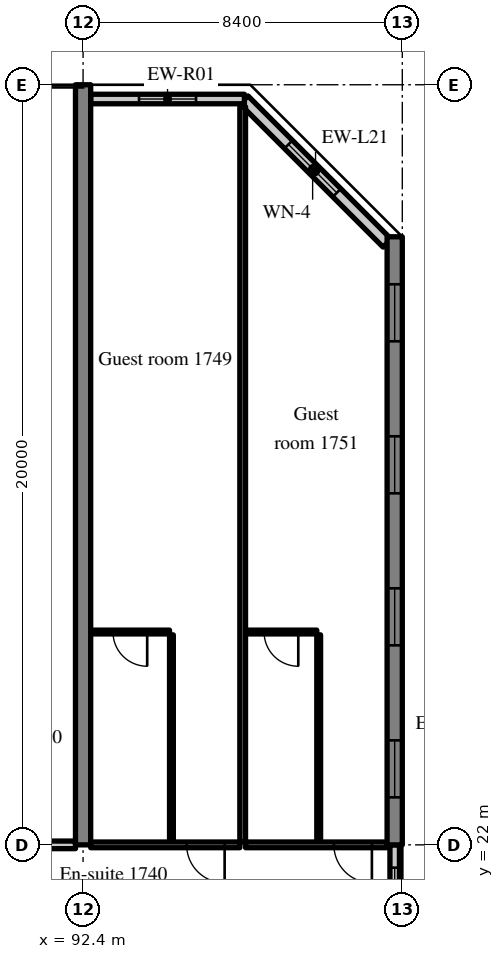
"""IFC4 building model, lengths in metres.
Left out: names, types, materials, properties, quantities, classifications, styles, units other than length and angle.
Written with IfcOpenShell. Run it as: python <this file> out.ifc"""

import sys

from ifc_helpers import new_model, si_unit, direction, frame, frame_2d, origin, place, context, subcontext, project, spatial, rectangle, extrude, source, transform, mapped, element, fill, save


model = new_model("IFC4")
c1 = context("Model", 3, precision=1e-05, world=origin(), true_north=direction((0.0, 1.0)))
c2 = subcontext(c1, "Body", "Model", "MODEL_VIEW")
j1 = project(units=[si_unit("LENGTHUNIT", "METRE"), si_unit("PLANEANGLEUNIT", "RADIAN")], contexts=[c1])
p1 = place(None, origin())
s1 = spatial("IfcSite", under=j1, at=p1, CompositionType="ELEMENT")
p2 = place(p1, origin())
s2 = spatial("IfcBuilding", under=s1, at=p2, CompositionType="ELEMENT")
p3 = place(p2, frame((0.0, 0.0, 73.4)))
s3 = spatial("IfcBuildingStorey", under=s2, at=p3, CompositionType="ELEMENT", Elevation=73.4)
m1 = source(origin(), c2, "Body", "SweptSolid", [
    extrude(rectangle(XDim=20.0, YDim=0.4, at=frame_2d((10.0, 0.0))), origin(), (0.0, 0.0, 1.0), 3.52),
])
p4 = place(p3, frame((92.4, 22.0, 0.0), z_axis=(0.0, 0.0, 1.0), x_axis=(0.0, 1.0, 0.0)))
e1 = element("IfcWall", 1, at=p4, inside=s3, PredefinedType="SHEAR", context=c2, shape_type="MappedRepresentation", body=[
    mapped(m1, transform((0.0, 0.0, 0.0), scale=1.0)),
])
m2 = source(origin(), c2, "Body", "SweptSolid", [
    extrude(rectangle(XDim=16.0, YDim=0.4, at=frame_2d((8.0, 0.0))), origin(), (0.0, 0.0, 1.0), 3.52),
])
p5 = place(p3, frame((100.6, 22.0, 0.0), z_axis=(0.0, 0.0, 1.0), x_axis=(0.0, 1.0, 0.0)))
e2 = element("IfcWall", 2, at=p5, inside=s3, PredefinedType="SHEAR", context=c2, shape_type="MappedRepresentation", body=[
    mapped(m2, transform((0.0, 0.0, 0.0), scale=1.0)),
])
m3 = source(origin(), c2, "Body", "SweptSolid", [
    extrude(rectangle(XDim=1.5, YDim=1.5, at=frame_2d((0.75, 0.75))), frame((0.0, 0.21, 0.0), z_axis=(0.0, -1.0, 0.0), x_axis=(1.0, 0.0, 0.0)), (0.0, 0.0, 1.0), 0.42),
])
p6 = place(p5, frame((1.25, 0.0, 0.9)))
e3 = element("IfcOpeningElement", 3, at=p6, cuts=e2, PredefinedType="OPENING", context=c2, shape_type="MappedRepresentation", body=[
    mapped(m3, transform((0.0, 0.0, 0.0), scale=1.0)),
])
p7 = place(p5, frame((5.25, 0.0, 0.9)))
e4 = element("IfcOpeningElement", 4, at=p7, cuts=e2, PredefinedType="OPENING", context=c2, shape_type="MappedRepresentation", body=[
    mapped(m3, transform((0.0, 0.0, 0.0), scale=1.0)),
])
p8 = place(p5, frame((9.25, 0.0, 0.9)))
e5 = element("IfcOpeningElement", 5, at=p8, cuts=e2, PredefinedType="OPENING", context=c2, shape_type="MappedRepresentation", body=[
    mapped(m3, transform((0.0, 0.0, 0.0), scale=1.0)),
])
p9 = place(p5, frame((13.25, 0.0, 0.9)))
e6 = element("IfcOpeningElement", 6, at=p9, cuts=e2, PredefinedType="OPENING", context=c2, shape_type="MappedRepresentation", body=[
    mapped(m3, transform((0.0, 0.0, 0.0), scale=1.0)),
])
m4 = source(origin(), c2, "Body", "SweptSolid", [
    extrude(rectangle(XDim=5.326, YDim=0.3, at=frame_2d((2.663, 0.0))), origin(), (0.0, 0.0, 1.0), 3.52),
])
p10 = place(p3, frame((100.4, 37.834, 0.0), z_axis=(0.0, 0.0, 1.0), x_axis=(-0.707083859269, 0.707129702361, 0.0)))
e7 = element("IfcWall", 7, at=p10, inside=s3, PredefinedType="SOLIDWALL", context=c2, shape_type="MappedRepresentation", body=[
    mapped(m4, transform((0.0, 0.0, 0.0), scale=1.0)),
])
m5 = source(origin(), c2, "Body", "SweptSolid", [
    extrude(rectangle(XDim=1.8, YDim=1.5, at=frame_2d((0.9, 0.75))), frame((0.0, 0.16, 0.0), z_axis=(0.0, -1.0, 0.0), x_axis=(1.0, 0.0, 0.0)), (0.0, 0.0, 1.0), 0.32),
])
p11 = place(p10, frame((1.871, 0.0, 0.9)))
e8 = element("IfcOpeningElement", 8, at=p11, cuts=e7, PredefinedType="OPENING", context=c2, shape_type="MappedRepresentation", body=[
    mapped(m5, transform((0.0, 0.0, 0.0), scale=1.0)),
])
m6 = source(origin(), c2, "Body", "SweptSolid", [
    extrude(rectangle(XDim=4.045, YDim=0.25, at=frame_2d((2.022, 0.0))), origin(), (0.0, 0.0, 1.0), 2.82),
])
p12 = place(p3, frame((96.645, 41.625, 0.0), z_axis=(0.0, 0.0, 1.0), x_axis=(-1.0, 0.0, 0.0)))
e9 = element("IfcWall", 9, at=p12, inside=s3, PredefinedType="SOLIDWALL", context=c2, shape_type="MappedRepresentation", body=[
    mapped(m6, transform((0.0, 0.0, 0.0), scale=1.0)),
])
m7 = source(origin(), c2, "Body", "SweptSolid", [
    extrude(rectangle(XDim=1.5, YDim=1.5, at=frame_2d((0.75, 0.75))), frame((0.0, 0.135, 0.0), z_axis=(0.0, -1.0, 0.0), x_axis=(1.0, 0.0, 0.0)), (0.0, 0.0, 1.0), 0.27),
])
p13 = place(p12, frame((1.272, 0.0, 0.9)))
e10 = element("IfcOpeningElement", 10, at=p13, cuts=e9, PredefinedType="OPENING", context=c2, shape_type="MappedRepresentation", body=[
    mapped(m7, transform((0.0, 0.0, 0.0), scale=1.0)),
])
m8 = source(origin(), c2, "Body", "SweptSolid", [
    extrude(rectangle(XDim=2.4, YDim=0.25, at=frame_2d((1.2, 0.0))), origin(), (0.0, 0.0, 1.0), 2.62),
])
p14 = place(p3, frame((100.6, 19.6, 0.0), z_axis=(0.0, 0.0, 1.0), x_axis=(0.0, 1.0, 0.0)))
e11 = element("IfcWall", 11, at=p14, inside=s3, PredefinedType="SOLIDWALL", context=c2, shape_type="MappedRepresentation", body=[
    mapped(m8, transform((0.0, 0.0, 0.0), scale=1.0)),
])
m9 = source(origin(), c2, "Body", "SweptSolid", [
    extrude(rectangle(XDim=1.2, YDim=1.5, at=frame_2d((0.6, 0.75))), frame((0.0, 0.135, 0.0), z_axis=(0.0, -1.0, 0.0), x_axis=(1.0, 0.0, 0.0)), (0.0, 0.0, 1.0), 0.27),
])
p15 = place(p14, frame((0.6, 0.0, 0.9)))
e12 = element("IfcOpeningElement", 12, at=p15, cuts=e11, PredefinedType="OPENING", context=c2, shape_type="MappedRepresentation", body=[
    mapped(m9, transform((0.0, 0.0, 0.0), scale=1.0)),
])
m10 = source(origin(), c2, "Body", "SweptSolid", [
    extrude(rectangle(XDim=5.45, YDim=0.1, at=frame_2d((2.725, 0.0))), origin(), (0.0, 0.0, 1.0), 3.52),
])
p16 = place(p3, frame((94.725, 22.075, 0.0), z_axis=(0.0, 0.0, 1.0), x_axis=(0.0, 1.0, 0.0)))
e13 = element("IfcWall", 13, at=p16, inside=s3, PredefinedType="PARTITIONING", context=c2, shape_type="MappedRepresentation", body=[
    mapped(m10, transform((0.0, 0.0, 0.0), scale=1.0)),
])
m11 = source(origin(), c2, "Body", "SweptSolid", [
    extrude(rectangle(XDim=2.075, YDim=0.1, at=frame_2d((1.038, 0.0))), origin(), (0.0, 0.0, 1.0), 3.52),
])
p17 = place(p3, frame((92.6, 27.6, 0.0), z_axis=(0.0, 0.0, 1.0), x_axis=(1.0, 0.0, 0.0)))
e14 = element("IfcWall", 14, at=p17, inside=s3, PredefinedType="PARTITIONING", context=c2, shape_type="MappedRepresentation", body=[
    mapped(m11, transform((0.0, 0.0, 0.0), scale=1.0)),
])
m12 = source(origin(), c2, "Body", "SweptSolid", [
    extrude(rectangle(XDim=0.9, YDim=2.1, at=frame_2d((0.45, 1.05))), frame((0.0, 0.06, 0.0), z_axis=(0.0, -1.0, 0.0), x_axis=(1.0, 0.0, 0.0)), (0.0, 0.0, 1.0), 0.12),
])
p18 = place(p17, frame((0.587, 0.0, 0.0)))
e15 = element("IfcOpeningElement", 15, at=p18, cuts=e14, PredefinedType="OPENING", context=c2, shape_type="MappedRepresentation", body=[
    mapped(m12, transform((0.0, 0.0, 0.0), scale=1.0)),
])
m13 = source(origin(), c2, "Body", "SweptSolid", [
    extrude(rectangle(XDim=3.925, YDim=0.15, at=frame_2d((1.962, 0.0))), origin(), (0.0, 0.0, 1.0), 2.82),
])
p19 = place(p3, frame((92.6, 22.0, 0.0), z_axis=(0.0, 0.0, 1.0), x_axis=(1.0, 0.0, 0.0)))
e16 = element("IfcWall", 16, at=p19, inside=s3, PredefinedType="PARTITIONING", context=c2, shape_type="MappedRepresentation", body=[
    mapped(m13, transform((0.0, 0.0, 0.0), scale=1.0)),
])
m14 = source(origin(), c2, "Body", "SweptSolid", [
    extrude(rectangle(XDim=1.0, YDim=2.1, at=frame_2d((0.5, 1.05))), frame((0.0, 0.085, 0.0), z_axis=(0.0, -1.0, 0.0), x_axis=(1.0, 0.0, 0.0)), (0.0, 0.0, 1.0), 0.17),
])
p20 = place(p19, frame((2.525, 0.0, 0.0)))
e17 = element("IfcOpeningElement", 17, at=p20, cuts=e16, PredefinedType="OPENING", context=c2, shape_type="MappedRepresentation", body=[
    mapped(m14, transform((0.0, 0.0, 0.0), scale=1.0)),
])
p21 = place(p3, frame((98.6, 22.075, 0.0), z_axis=(0.0, 0.0, 1.0), x_axis=(0.0, 1.0, 0.0)))
e18 = element("IfcWall", 18, at=p21, inside=s3, PredefinedType="PARTITIONING", context=c2, shape_type="MappedRepresentation", body=[
    mapped(m10, transform((0.0, 0.0, 0.0), scale=1.0)),
])
m15 = source(origin(), c2, "Body", "SweptSolid", [
    extrude(rectangle(XDim=1.875, YDim=0.1, at=frame_2d((0.938, 0.0))), origin(), (0.0, 0.0, 1.0), 3.52),
])
p22 = place(p3, frame((96.675, 27.6, 0.0), z_axis=(0.0, 0.0, 1.0), x_axis=(1.0, 0.0, 0.0)))
e19 = element("IfcWall", 19, at=p22, inside=s3, PredefinedType="PARTITIONING", context=c2, shape_type="MappedRepresentation", body=[
    mapped(m15, transform((0.0, 0.0, 0.0), scale=1.0)),
])
p23 = place(p22, frame((0.488, 0.0, 0.0)))
e20 = element("IfcOpeningElement", 20, at=p23, cuts=e19, PredefinedType="OPENING", context=c2, shape_type="MappedRepresentation", body=[
    mapped(m12, transform((0.0, 0.0, 0.0), scale=1.0)),
])
m16 = source(origin(), c2, "Body", "SweptSolid", [
    extrude(rectangle(XDim=3.725, YDim=0.15, at=frame_2d((1.862, 0.0))), origin(), (0.0, 0.0, 1.0), 2.82),
])
p24 = place(p3, frame((96.675, 22.0, 0.0), z_axis=(0.0, 0.0, 1.0), x_axis=(1.0, 0.0, 0.0)))
e21 = element("IfcWall", 21, at=p24, inside=s3, PredefinedType="PARTITIONING", context=c2, shape_type="MappedRepresentation", body=[
    mapped(m16, transform((0.0, 0.0, 0.0), scale=1.0)),
])
p25 = place(p24, frame((2.325, 0.0, 0.0)))
e22 = element("IfcOpeningElement", 22, at=p25, cuts=e21, PredefinedType="OPENING", context=c2, shape_type="MappedRepresentation", body=[
    mapped(m14, transform((0.0, 0.0, 0.0), scale=1.0)),
])
m17 = source(origin(), c2, "Body", "SweptSolid", [
    extrude(rectangle(XDim=19.347, YDim=0.15, at=frame_2d((9.674, 0.0))), origin(), (0.0, 0.0, 1.0), 3.52),
])
p26 = place(p3, frame((96.6, 22.075, 0.0), z_axis=(0.0, 0.0, 1.0), x_axis=(0.0, 1.0, 0.0)))
e23 = element("IfcWall", 23, at=p26, inside=s3, PredefinedType="PARTITIONING", context=c2, shape_type="MappedRepresentation", body=[
    mapped(m17, transform((0.0, 0.0, 0.0), scale=1.0)),
])
m18 = source(origin(), c2, "Body", "SweptSolid", [
    extrude(rectangle(XDim=8.0, YDim=0.2, at=frame_2d((4.0, 0.0))), origin(), (0.0, 0.0, 1.0), 2.82),
])
p27 = place(p3, frame((84.2, 22.0, 0.0), z_axis=(0.0, 0.0, 1.0), x_axis=(1.0, 0.0, 0.0)))
e24 = element("IfcWall", 24, at=p27, inside=s3, PredefinedType="PARTITIONING", context=c2, shape_type="MappedRepresentation", body=[
    mapped(m18, transform((0.0, 0.0, 0.0), scale=1.0)),
])
m19 = source(origin(), c2, "Body", "SweptSolid", [
    extrude(rectangle(XDim=1.8, YDim=1.5, at=frame_2d((0.9, 0.75))), frame((0.0, 0.03, 0.0), z_axis=(0.0, -1.0, 0.0), x_axis=(1.0, 0.0, 0.0)), (0.0, 0.0, 1.0), 0.06),
])
p28 = place(p11, origin())
e25 = element("IfcWindow", 25, at=p28, inside=s3, PartitioningType="SINGLE_PANEL", PredefinedType="WINDOW", context=c2, shape_type="MappedRepresentation", body=[
    mapped(m19, transform((0.0, 0.0, 0.0), scale=1.0)),
])
fill(e8, e25)
m20 = source(origin(), c2, "Body", "SweptSolid", [
    extrude(rectangle(XDim=1.5, YDim=1.5, at=frame_2d((0.75, 0.75))), frame((0.0, 0.03, 0.0), z_axis=(0.0, -1.0, 0.0), x_axis=(1.0, 0.0, 0.0)), (0.0, 0.0, 1.0), 0.06),
])
p29 = place(p13, origin())
e26 = element("IfcWindow", 26, at=p29, inside=s3, PartitioningType="SINGLE_PANEL", PredefinedType="WINDOW", context=c2, shape_type="MappedRepresentation", body=[
    mapped(m20, transform((0.0, 0.0, 0.0), scale=1.0)),
])
fill(e10, e26)
p30 = place(p6, origin())
e27 = element("IfcWindow", 27, at=p30, inside=s3, PartitioningType="SINGLE_PANEL", PredefinedType="WINDOW", context=c2, shape_type="MappedRepresentation", body=[
    mapped(m20, transform((0.0, 0.0, 0.0), scale=1.0)),
])
fill(e3, e27)
p31 = place(p7, origin())
e28 = element("IfcWindow", 28, at=p31, inside=s3, PartitioningType="SINGLE_PANEL", PredefinedType="WINDOW", context=c2, shape_type="MappedRepresentation", body=[
    mapped(m20, transform((0.0, 0.0, 0.0), scale=1.0)),
])
fill(e4, e28)
p32 = place(p8, origin())
e29 = element("IfcWindow", 29, at=p32, inside=s3, PartitioningType="SINGLE_PANEL", PredefinedType="WINDOW", context=c2, shape_type="MappedRepresentation", body=[
    mapped(m20, transform((0.0, 0.0, 0.0), scale=1.0)),
])
fill(e5, e29)
p33 = place(p9, origin())
e30 = element("IfcWindow", 30, at=p33, inside=s3, PartitioningType="SINGLE_PANEL", PredefinedType="WINDOW", context=c2, shape_type="MappedRepresentation", body=[
    mapped(m20, transform((0.0, 0.0, 0.0), scale=1.0)),
])
fill(e6, e30)
m21 = source(origin(), c2, "Body", "SweptSolid", [
    extrude(rectangle(XDim=1.2, YDim=1.5, at=frame_2d((0.6, 0.75))), frame((0.0, 0.03, 0.0), z_axis=(0.0, -1.0, 0.0), x_axis=(1.0, 0.0, 0.0)), (0.0, 0.0, 1.0), 0.06),
])
p34 = place(p15, origin())
e31 = element("IfcWindow", 31, at=p34, inside=s3, PartitioningType="SINGLE_PANEL", PredefinedType="WINDOW", context=c2, shape_type="MappedRepresentation", body=[
    mapped(m21, transform((0.0, 0.0, 0.0), scale=1.0)),
])
fill(e12, e31)
m22 = source(origin(), c2, "Body", "SweptSolid", [
    extrude(rectangle(XDim=0.9, YDim=2.1, at=frame_2d((0.45, 1.05))), frame((0.0, 0.025, 0.0), z_axis=(0.0, -1.0, 0.0), x_axis=(1.0, 0.0, 0.0)), (0.0, 0.0, 1.0), 0.05),
])
p35 = place(p18, origin())
e32 = element("IfcDoor", 32, at=p35, inside=s3, OperationType="SINGLE_SWING_RIGHT", PredefinedType="DOOR", context=c2, shape_type="MappedRepresentation", body=[
    mapped(m22, transform((0.0, 0.0, 0.0), scale=1.0)),
])
fill(e15, e32)
m23 = source(origin(), c2, "Body", "SweptSolid", [
    extrude(rectangle(XDim=1.0, YDim=2.1, at=frame_2d((0.5, 1.05))), frame((0.0, 0.025, 0.0), z_axis=(0.0, -1.0, 0.0), x_axis=(1.0, 0.0, 0.0)), (0.0, 0.0, 1.0), 0.05),
])
p36 = place(p20, origin())
e33 = element("IfcDoor", 33, at=p36, inside=s3, OperationType="SINGLE_SWING_RIGHT", PredefinedType="DOOR", context=c2, shape_type="MappedRepresentation", body=[
    mapped(m23, transform((0.0, 0.0, 0.0), scale=1.0)),
])
fill(e17, e33)
p37 = place(p23, origin())
e34 = element("IfcDoor", 34, at=p37, inside=s3, OperationType="SINGLE_SWING_RIGHT", PredefinedType="DOOR", context=c2, shape_type="MappedRepresentation", body=[
    mapped(m22, transform((0.0, 0.0, 0.0), scale=1.0)),
])
fill(e20, e34)
p38 = place(p25, origin())
e35 = element("IfcDoor", 35, at=p38, inside=s3, OperationType="SINGLE_SWING_RIGHT", PredefinedType="DOOR", context=c2, shape_type="MappedRepresentation", body=[
    mapped(m23, transform((0.0, 0.0, 0.0), scale=1.0)),
])
fill(e22, e35)
save(model, sys.argv[1])
